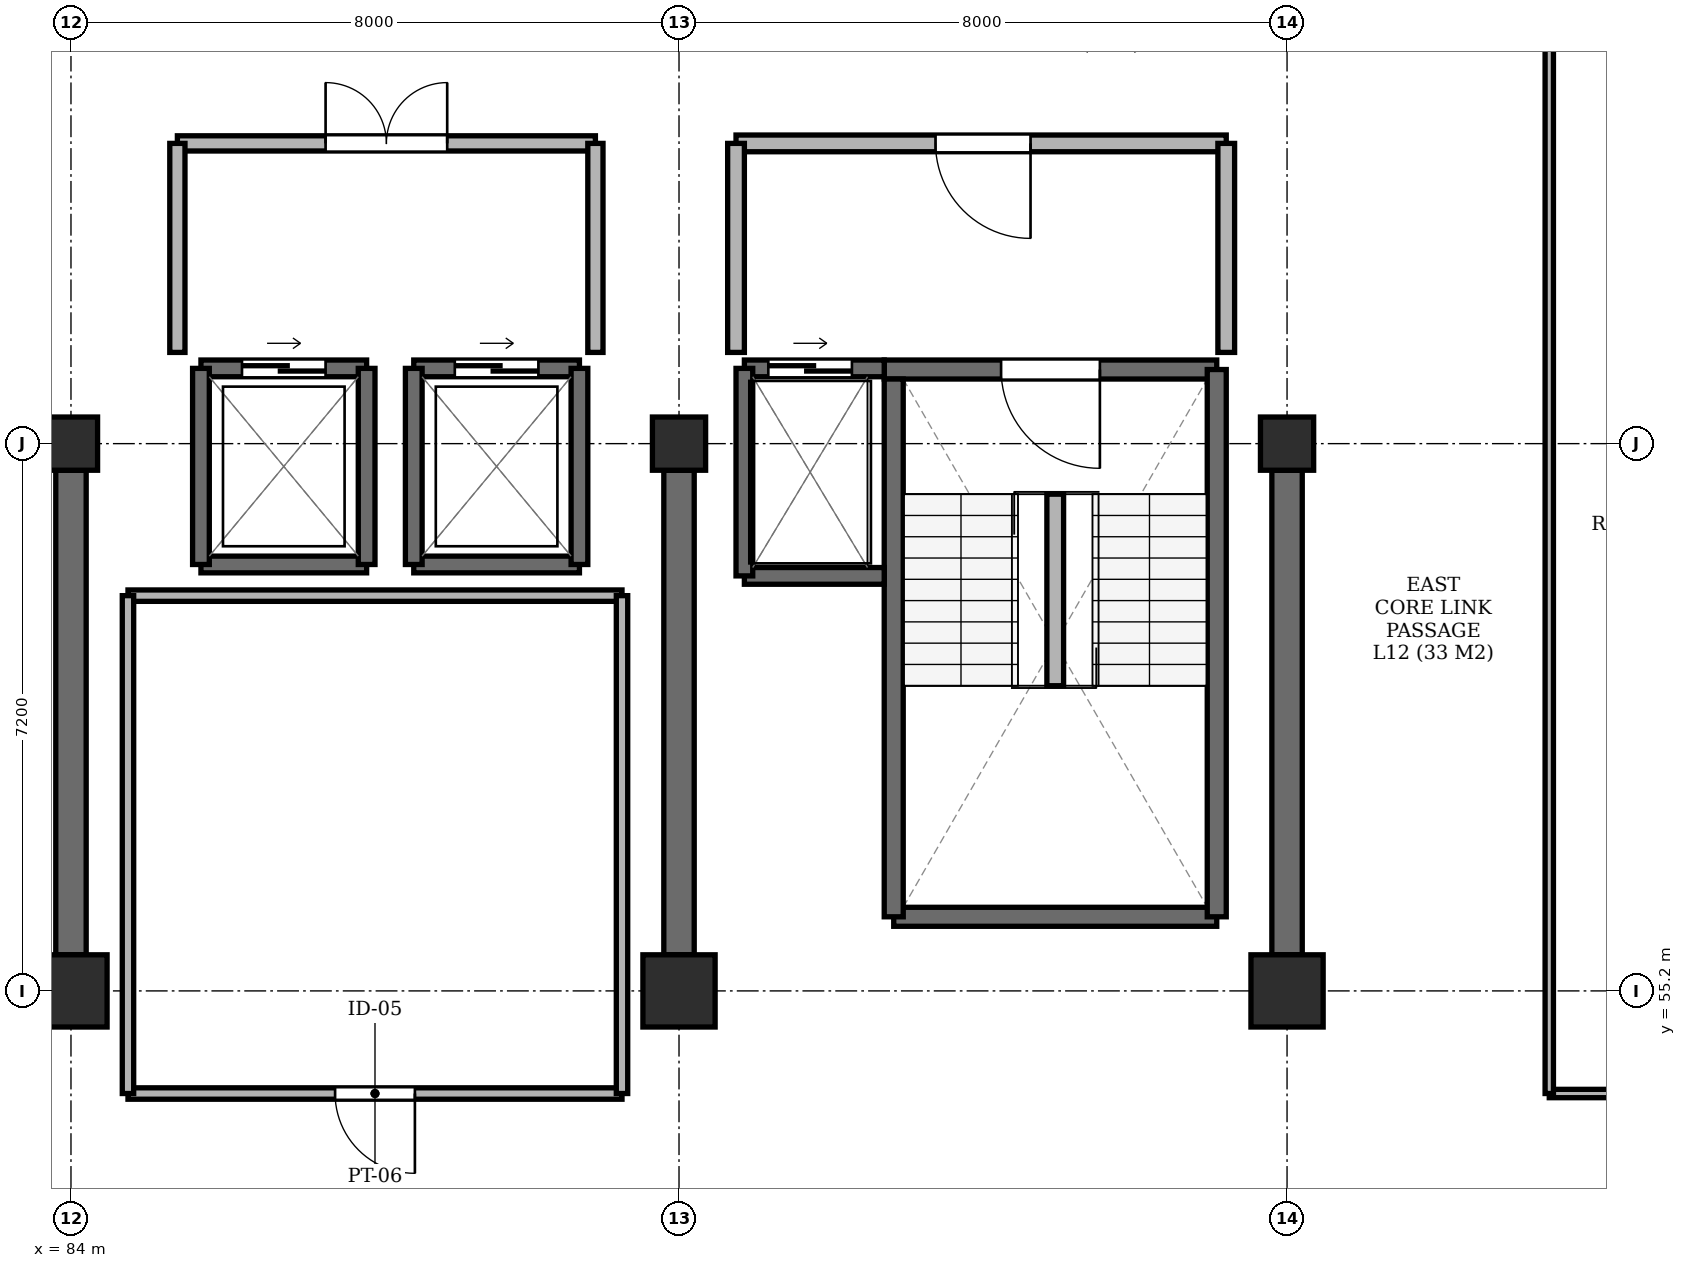
"""IFC4 building model, lengths in metres.
Left out: names, types, materials, properties, quantities, classifications, styles, units other than length and angle.
Written with IfcOpenShell. Run it as: python <this file> out.ifc"""

import sys

from ifc_helpers import new_model, si_unit, direction, frame, frame_2d, origin, origin_2d, place, context, subcontext, project, spatial, rectangle, extrude, element, fill, save


model = new_model("IFC4")
c1 = context("Model", 3, precision=1e-05, world=origin(), true_north=direction((0.0, 1.0)))
c2 = subcontext(c1, "Body", "Model", "MODEL_VIEW")
j1 = project(units=[si_unit("LENGTHUNIT", "METRE"), si_unit("PLANEANGLEUNIT", "RADIAN")], contexts=[c1])
p1 = place(None, origin())
s1 = spatial("IfcSite", under=j1, at=p1, CompositionType="ELEMENT")
p2 = place(p1, origin())
s2 = spatial("IfcBuilding", under=s1, at=p2, CompositionType="ELEMENT")
p3 = place(p2, frame((0.0, 0.0, 50.3)))
s3 = spatial("IfcBuildingStorey", under=s2, at=p3, CompositionType="ELEMENT", Elevation=50.3)
p4 = place(p3, frame((84.0, 55.2, -0.23), z_axis=(0.0, 0.0, 1.0), x_axis=(1.0, 0.0, 0.0)))
e1 = element("IfcColumn", 1, at=p4, inside=s3, PredefinedType="COLUMN", context=c2, shape_type="SweptSolid", body=[
    extrude(rectangle(XDim=0.95, YDim=0.95, at=origin_2d()), origin(), (0.0, 0.0, 1.0), 3.26),
])
p5 = place(p3, frame((84.0, 62.4, -0.23), z_axis=(0.0, 0.0, 1.0), x_axis=(1.0, 0.0, 0.0)))
e2 = element("IfcColumn", 2, at=p5, inside=s3, PredefinedType="COLUMN", context=c2, shape_type="SweptSolid", body=[
    extrude(rectangle(XDim=0.7, YDim=0.7, at=origin_2d()), origin(), (0.0, 0.0, 1.0), 3.26),
])
p6 = place(p3, frame((92.0, 55.2, -0.23), z_axis=(0.0, 0.0, 1.0), x_axis=(1.0, 0.0, 0.0)))
e3 = element("IfcColumn", 3, at=p6, inside=s3, PredefinedType="COLUMN", context=c2, shape_type="SweptSolid", body=[
    extrude(rectangle(XDim=0.95, YDim=0.95, at=origin_2d()), origin(), (0.0, 0.0, 1.0), 3.26),
])
p7 = place(p3, frame((92.0, 62.4, -0.23), z_axis=(0.0, 0.0, 1.0), x_axis=(1.0, 0.0, 0.0)))
e4 = element("IfcColumn", 4, at=p7, inside=s3, PredefinedType="COLUMN", context=c2, shape_type="SweptSolid", body=[
    extrude(rectangle(XDim=0.7, YDim=0.7, at=origin_2d()), origin(), (0.0, 0.0, 1.0), 3.26),
])
p8 = place(p3, frame((100.0, 55.2, -0.23), z_axis=(0.0, 0.0, 1.0), x_axis=(1.0, 0.0, 0.0)))
e5 = element("IfcColumn", 5, at=p8, inside=s3, PredefinedType="COLUMN", context=c2, shape_type="SweptSolid", body=[
    extrude(rectangle(XDim=0.95, YDim=0.95, at=origin_2d()), origin(), (0.0, 0.0, 1.0), 3.26),
])
p9 = place(p3, frame((100.0, 62.4, -0.23), z_axis=(0.0, 0.0, 1.0), x_axis=(1.0, 0.0, 0.0)))
e6 = element("IfcColumn", 6, at=p9, inside=s3, PredefinedType="COLUMN", context=c2, shape_type="SweptSolid", body=[
    extrude(rectangle(XDim=0.7, YDim=0.7, at=origin_2d()), origin(), (0.0, 0.0, 1.0), 3.26),
])
for number, where, z_axis, x_axis in (
    (7, (84.0, 55.675, 0.0), (0.0, 0.0, 1.0), (0.0, 1.0, 0.0)),
    (8, (92.0, 55.675, 0.0), (0.0, 0.0, 1.0), (0.0, 1.0, 0.0)),
    (9, (100.0, 55.675, 0.0), (0.0, 0.0, 1.0), (0.0, 1.0, 0.0)),
):
    element("IfcWall", number, at=place(p3, frame(where, z_axis=z_axis, x_axis=x_axis)), inside=s3, PredefinedType="SHEAR", context=c2, shape_type="SweptSolid", body=[
        extrude(rectangle(XDim=6.375, YDim=0.4, at=frame_2d((3.188, 0.0))), origin(), (0.0, 0.0, 1.0), 3.03),
    ])
p10 = place(p3, frame((94.825, 56.175, 0.0), z_axis=(0.0, 0.0, 1.0), x_axis=(1.0, 0.0, 0.0)))
e10 = element("IfcWall", 10, at=p10, inside=s3, PredefinedType="SHEAR", context=c2, shape_type="SweptSolid", body=[
    extrude(rectangle(XDim=4.25, YDim=0.25, at=frame_2d((2.125, 0.0))), origin(), (0.0, 0.0, 1.0), 3.03),
])
p11 = place(p3, frame((99.075, 63.375, 0.0), z_axis=(0.0, 0.0, 1.0), x_axis=(-1.0, 0.0, 0.0)))
e11 = element("IfcWall", 11, at=p11, inside=s3, PredefinedType="SHEAR", context=c2, shape_type="SweptSolid", body=[
    extrude(rectangle(XDim=4.375, YDim=0.25, at=frame_2d((2.188, 0.0))), origin(), (0.0, 0.0, 1.0), 3.03),
])
p12 = place(p11, frame((1.538, 0.0, 0.0)))
e12 = element("IfcOpeningElement", 12, at=p12, cuts=e11, PredefinedType="OPENING", context=c2, shape_type="SweptSolid", body=[
    extrude(rectangle(XDim=1.3, YDim=2.2, at=frame_2d((0.65, 1.1))), frame((0.0, 0.137, 0.0), z_axis=(0.0, -1.0, 0.0), x_axis=(1.0, 0.0, 0.0)), (0.0, 0.0, 1.0), 0.274),
])
p13 = place(p3, frame((94.825, 63.25, 0.0), z_axis=(0.0, 0.0, 1.0), x_axis=(0.0, -1.0, 0.0)))
e13 = element("IfcWall", 13, at=p13, inside=s3, PredefinedType="SHEAR", context=c2, shape_type="SweptSolid", body=[
    extrude(rectangle(XDim=7.075, YDim=0.25, at=frame_2d((3.538, 0.0))), origin(), (0.0, 0.0, 1.0), 3.03),
])
p14 = place(p3, frame((99.075, 56.175, 0.0), z_axis=(0.0, 0.0, 1.0), x_axis=(0.0, 1.0, 0.0)))
e14 = element("IfcWall", 14, at=p14, inside=s3, PredefinedType="SHEAR", context=c2, shape_type="SweptSolid", body=[
    extrude(rectangle(XDim=7.2, YDim=0.25, at=frame_2d((3.6, 0.0))), origin(), (0.0, 0.0, 1.0), 3.03),
])
p15 = place(p3, frame((96.95, 59.215, 0.0), z_axis=(0.0, 0.0, 1.0), x_axis=(0.0, 1.0, 0.0)))
e15 = element("IfcWall", 15, at=p15, inside=s3, PredefinedType="PARTITIONING", context=c2, shape_type="SweptSolid", body=[
    extrude(rectangle(XDim=2.52, YDim=0.22, at=frame_2d((1.26, 0.0))), origin(), (0.0, 0.0, 1.0), 3.03),
])
p16 = place(p3, frame((92.86, 60.66, 0.0), z_axis=(0.0, 0.0, 1.0), x_axis=(1.0, 0.0, 0.0)))
e16 = element("IfcWall", 16, at=p16, inside=s3, PredefinedType="SHEAR", context=c2, shape_type="SweptSolid", body=[
    extrude(rectangle(XDim=1.84, YDim=0.22, at=frame_2d((0.92, 0.0))), origin(), (0.0, 0.0, 1.0), 3.03),
])
p17 = place(p3, frame((94.7, 63.39, 0.0), z_axis=(0.0, 0.0, 1.0), x_axis=(-1.0, 0.0, 0.0)))
e17 = element("IfcWall", 17, at=p17, inside=s3, PredefinedType="SHEAR", context=c2, shape_type="SweptSolid", body=[
    extrude(rectangle(XDim=1.84, YDim=0.22, at=frame_2d((0.92, 0.0))), origin(), (0.0, 0.0, 1.0), 3.03),
])
p18 = place(p17, frame((0.425, 0.0, 0.0)))
e18 = element("IfcOpeningElement", 18, at=p18, cuts=e17, PredefinedType="OPENING", context=c2, shape_type="SweptSolid", body=[
    extrude(rectangle(XDim=1.1, YDim=2.2, at=frame_2d((0.55, 1.1))), frame((0.0, 0.122, 0.0), z_axis=(0.0, -1.0, 0.0), x_axis=(1.0, 0.0, 0.0)), (0.0, 0.0, 1.0), 0.244),
])
p19 = place(p3, frame((92.86, 63.39, 0.0), z_axis=(0.0, 0.0, 1.0), x_axis=(0.0, -1.0, 0.0)))
e19 = element("IfcWall", 19, at=p19, inside=s3, PredefinedType="SHEAR", context=c2, shape_type="SweptSolid", body=[
    extrude(rectangle(XDim=2.73, YDim=0.22, at=frame_2d((1.365, 0.0))), origin(), (0.0, 0.0, 1.0), 3.03),
])
p20 = place(p3, frame((85.71, 60.81, 0.0), z_axis=(0.0, 0.0, 1.0), x_axis=(1.0, 0.0, 0.0)))
e20 = element("IfcWall", 20, at=p20, inside=s3, PredefinedType="SHEAR", context=c2, shape_type="SweptSolid", body=[
    extrude(rectangle(XDim=2.18, YDim=0.22, at=frame_2d((1.09, 0.0))), origin(), (0.0, 0.0, 1.0), 3.03),
])
p21 = place(p3, frame((87.89, 63.39, 0.0), z_axis=(0.0, 0.0, 1.0), x_axis=(-1.0, 0.0, 0.0)))
e21 = element("IfcWall", 21, at=p21, inside=s3, PredefinedType="SHEAR", context=c2, shape_type="SweptSolid", body=[
    extrude(rectangle(XDim=2.18, YDim=0.22, at=frame_2d((1.09, 0.0))), origin(), (0.0, 0.0, 1.0), 3.03),
])
p22 = place(p21, frame((0.54, 0.0, 0.0)))
e22 = element("IfcOpeningElement", 22, at=p22, cuts=e21, PredefinedType="OPENING", context=c2, shape_type="SweptSolid", body=[
    extrude(rectangle(XDim=1.1, YDim=2.2, at=frame_2d((0.55, 1.1))), frame((0.0, 0.122, 0.0), z_axis=(0.0, -1.0, 0.0), x_axis=(1.0, 0.0, 0.0)), (0.0, 0.0, 1.0), 0.244),
])
for number, where, z_axis, x_axis in (
    (23, (85.71, 63.39, 0.0), (0.0, 0.0, 1.0), (0.0, -1.0, 0.0)),
    (24, (87.89, 60.81, 0.0), (0.0, 0.0, 1.0), (0.0, 1.0, 0.0)),
):
    element("IfcWall", number, at=place(p3, frame(where, z_axis=z_axis, x_axis=x_axis)), inside=s3, PredefinedType="SHEAR", context=c2, shape_type="SweptSolid", body=[
        extrude(rectangle(XDim=2.58, YDim=0.22, at=frame_2d((1.29, 0.0))), origin(), (0.0, 0.0, 1.0), 3.03),
    ])
p23 = place(p3, frame((88.51, 60.81, 0.0), z_axis=(0.0, 0.0, 1.0), x_axis=(1.0, 0.0, 0.0)))
e25 = element("IfcWall", 25, at=p23, inside=s3, PredefinedType="SHEAR", context=c2, shape_type="SweptSolid", body=[
    extrude(rectangle(XDim=2.18, YDim=0.22, at=frame_2d((1.09, 0.0))), origin(), (0.0, 0.0, 1.0), 3.03),
])
p24 = place(p3, frame((90.69, 63.39, 0.0), z_axis=(0.0, 0.0, 1.0), x_axis=(-1.0, 0.0, 0.0)))
e26 = element("IfcWall", 26, at=p24, inside=s3, PredefinedType="SHEAR", context=c2, shape_type="SweptSolid", body=[
    extrude(rectangle(XDim=2.18, YDim=0.22, at=frame_2d((1.09, 0.0))), origin(), (0.0, 0.0, 1.0), 3.03),
])
p25 = place(p24, frame((0.54, 0.0, 0.0)))
e27 = element("IfcOpeningElement", 27, at=p25, cuts=e26, PredefinedType="OPENING", context=c2, shape_type="SweptSolid", body=[
    extrude(rectangle(XDim=1.1, YDim=2.2, at=frame_2d((0.55, 1.1))), frame((0.0, 0.122, 0.0), z_axis=(0.0, -1.0, 0.0), x_axis=(1.0, 0.0, 0.0)), (0.0, 0.0, 1.0), 0.244),
])
for number, where, z_axis, x_axis in (
    (28, (88.51, 63.39, 0.0), (0.0, 0.0, 1.0), (0.0, -1.0, 0.0)),
    (29, (90.69, 60.81, 0.0), (0.0, 0.0, 1.0), (0.0, 1.0, 0.0)),
):
    element("IfcWall", number, at=place(p3, frame(where, z_axis=z_axis, x_axis=x_axis)), inside=s3, PredefinedType="SHEAR", context=c2, shape_type="SweptSolid", body=[
        extrude(rectangle(XDim=2.58, YDim=0.22, at=frame_2d((1.29, 0.0))), origin(), (0.0, 0.0, 1.0), 3.03),
    ])
p26 = place(p3, frame((92.75, 66.35, 0.0), z_axis=(0.0, 0.0, 1.0), x_axis=(1.0, 0.0, 0.0)))
e30 = element("IfcWall", 30, at=p26, inside=s3, PredefinedType="PARTITIONING", context=c2, shape_type="SweptSolid", body=[
    extrude(rectangle(XDim=6.45, YDim=0.22, at=frame_2d((3.225, 0.0))), origin(), (0.0, 0.0, 1.0), 2.53),
])
p27 = place(p26, frame((2.625, 0.0, 0.0)))
e31 = element("IfcOpeningElement", 31, at=p27, cuts=e30, PredefinedType="OPENING", context=c2, shape_type="SweptSolid", body=[
    extrude(rectangle(XDim=1.25, YDim=2.2, at=frame_2d((0.625, 1.1))), frame((0.0, 0.122, 0.0), z_axis=(0.0, -1.0, 0.0), x_axis=(1.0, 0.0, 0.0)), (0.0, 0.0, 1.0), 0.244),
])
for number, where, z_axis, x_axis in (
    (32, (92.75, 63.6, 0.0), (0.0, 0.0, 1.0), (0.0, 1.0, 0.0)),
    (33, (99.2, 63.6, 0.0), (0.0, 0.0, 1.0), (0.0, 1.0, 0.0)),
):
    element("IfcWall", number, at=place(p3, frame(where, z_axis=z_axis, x_axis=x_axis)), inside=s3, PredefinedType="PARTITIONING", context=c2, shape_type="SweptSolid", body=[
        extrude(rectangle(XDim=2.75, YDim=0.22, at=frame_2d((1.375, 0.0))), origin(), (0.0, 0.0, 1.0), 2.53),
    ])
p28 = place(p3, frame((85.4, 66.35, 0.0), z_axis=(0.0, 0.0, 1.0), x_axis=(1.0, 0.0, 0.0)))
e34 = element("IfcWall", 34, at=p28, inside=s3, PredefinedType="PARTITIONING", context=c2, shape_type="SweptSolid", body=[
    extrude(rectangle(XDim=5.5, YDim=0.2, at=frame_2d((2.75, 0.0))), origin(), (0.0, 0.0, 1.0), 2.53),
])
p29 = place(p28, frame((1.95, 0.0, 0.0)))
e35 = element("IfcOpeningElement", 35, at=p29, cuts=e34, PredefinedType="OPENING", context=c2, shape_type="SweptSolid", body=[
    extrude(rectangle(XDim=1.6, YDim=2.2, at=frame_2d((0.8, 1.1))), frame((0.0, 0.112, 0.0), z_axis=(0.0, -1.0, 0.0), x_axis=(1.0, 0.0, 0.0)), (0.0, 0.0, 1.0), 0.224),
])
for number, where, z_axis, x_axis in (
    (36, (85.4, 63.6, 0.0), (0.0, 0.0, 1.0), (0.0, 1.0, 0.0)),
    (37, (90.9, 63.6, 0.0), (0.0, 0.0, 1.0), (0.0, 1.0, 0.0)),
):
    element("IfcWall", number, at=place(p3, frame(where, z_axis=z_axis, x_axis=x_axis)), inside=s3, PredefinedType="PARTITIONING", context=c2, shape_type="SweptSolid", body=[
        extrude(rectangle(XDim=2.75, YDim=0.2, at=frame_2d((1.375, 0.0))), origin(), (0.0, 0.0, 1.0), 2.53),
    ])
p30 = place(p3, frame((103.45, 53.85, 0.0), z_axis=(0.0, 0.0, 1.0), x_axis=(1.0, 0.0, 0.0)))
e38 = element("IfcWall", 38, at=p30, inside=s3, PredefinedType="PARTITIONING", context=c2, shape_type="SweptSolid", body=[
    extrude(rectangle(XDim=3.75, YDim=0.11, at=frame_2d((1.875, 0.0))), origin(), (0.0, 0.0, 1.0), 2.53),
])
p31 = place(p30, frame((1.3, 0.0, 0.0)))
e39 = element("IfcOpeningElement", 39, at=p31, cuts=e38, PredefinedType="OPENING", context=c2, shape_type="SweptSolid", body=[
    extrude(rectangle(XDim=1.1, YDim=2.15, at=frame_2d((0.55, 1.075))), frame((0.0, 0.067, 0.0), z_axis=(0.0, -1.0, 0.0), x_axis=(1.0, 0.0, 0.0)), (0.0, 0.0, 1.0), 0.134),
])
p32 = place(p3, frame((103.45, 53.85, 0.0), z_axis=(0.0, 0.0, 1.0), x_axis=(0.0, 1.0, 0.0)))
e40 = element("IfcWall", 40, at=p32, inside=s3, PredefinedType="PARTITIONING", context=c2, shape_type="SweptSolid", body=[
    extrude(rectangle(XDim=14.95, YDim=0.11, at=frame_2d((7.475, 0.0))), origin(), (0.0, 0.0, 1.0), 2.53),
])
p33 = place(p3, frame((84.75, 53.85, 0.0), z_axis=(0.0, 0.0, 1.0), x_axis=(1.0, 0.0, 0.0)))
e41 = element("IfcWall", 41, at=p33, inside=s3, PredefinedType="PARTITIONING", context=c2, shape_type="SweptSolid", body=[
    extrude(rectangle(XDim=6.5, YDim=0.15, at=frame_2d((3.25, 0.0))), origin(), (0.0, 0.0, 1.0), 2.53),
])
p34 = place(p33, frame((2.725, 0.0, 0.0)))
e42 = element("IfcOpeningElement", 42, at=p34, cuts=e41, PredefinedType="OPENING", context=c2, shape_type="SweptSolid", body=[
    extrude(rectangle(XDim=1.05, YDim=2.15, at=frame_2d((0.525, 1.075))), frame((0.0, 0.087, 0.0), z_axis=(0.0, -1.0, 0.0), x_axis=(1.0, 0.0, 0.0)), (0.0, 0.0, 1.0), 0.174),
])
p35 = place(p3, frame((84.75, 60.4, 0.0), z_axis=(0.0, 0.0, 1.0), x_axis=(1.0, 0.0, 0.0)))
e43 = element("IfcWall", 43, at=p35, inside=s3, PredefinedType="PARTITIONING", context=c2, shape_type="SweptSolid", body=[
    extrude(rectangle(XDim=6.5, YDim=0.15, at=frame_2d((3.25, 0.0))), origin(), (0.0, 0.0, 1.0), 2.53),
])
for number, where, z_axis, x_axis in (
    (44, (84.75, 53.85, 0.0), (0.0, 0.0, 1.0), (0.0, 1.0, 0.0)),
    (45, (91.25, 53.85, 0.0), (0.0, 0.0, 1.0), (0.0, 1.0, 0.0)),
):
    element("IfcWall", number, at=place(p3, frame(where, z_axis=z_axis, x_axis=x_axis)), inside=s3, PredefinedType="PARTITIONING", context=c2, shape_type="SweptSolid", body=[
        extrude(rectangle(XDim=6.55, YDim=0.15, at=frame_2d((3.275, 0.0))), origin(), (0.0, 0.0, 1.0), 2.53),
    ])
p36 = place(p12, origin())
e46 = element("IfcDoor", 46, at=p36, inside=s3, OperationType="SINGLE_SWING_LEFT", PredefinedType="DOOR", context=c2, shape_type="SweptSolid", body=[
    extrude(rectangle(XDim=1.3, YDim=2.2, at=frame_2d((0.65, 1.1))), frame((0.0, 0.025, 0.0), z_axis=(0.0, -1.0, 0.0), x_axis=(1.0, 0.0, 0.0)), (0.0, 0.0, 1.0), 0.05),
])
fill(e12, e46)
p37 = place(p18, origin())
e47 = element("IfcDoor", 47, at=p37, inside=s3, OperationType="SLIDING_TO_LEFT", PredefinedType="DOOR", context=c2, shape_type="SweptSolid", body=[
    extrude(rectangle(XDim=1.1, YDim=2.2, at=frame_2d((0.55, 1.1))), frame((0.0, 0.025, 0.0), z_axis=(0.0, -1.0, 0.0), x_axis=(1.0, 0.0, 0.0)), (0.0, 0.0, 1.0), 0.05),
])
fill(e18, e47)
p38 = place(p22, origin())
e48 = element("IfcDoor", 48, at=p38, inside=s3, OperationType="SLIDING_TO_LEFT", PredefinedType="DOOR", context=c2, shape_type="SweptSolid", body=[
    extrude(rectangle(XDim=1.1, YDim=2.2, at=frame_2d((0.55, 1.1))), frame((0.0, 0.025, 0.0), z_axis=(0.0, -1.0, 0.0), x_axis=(1.0, 0.0, 0.0)), (0.0, 0.0, 1.0), 0.05),
])
fill(e22, e48)
p39 = place(p25, origin())
e49 = element("IfcDoor", 49, at=p39, inside=s3, OperationType="SLIDING_TO_LEFT", PredefinedType="DOOR", context=c2, shape_type="SweptSolid", body=[
    extrude(rectangle(XDim=1.1, YDim=2.2, at=frame_2d((0.55, 1.1))), frame((0.0, 0.025, 0.0), z_axis=(0.0, -1.0, 0.0), x_axis=(1.0, 0.0, 0.0)), (0.0, 0.0, 1.0), 0.05),
])
fill(e27, e49)
p40 = place(p27, frame((1.25, 0.0, 0.0), z_axis=(0.0, 0.0, 1.0), x_axis=(-1.0, 0.0, 0.0)))
e50 = element("IfcDoor", 50, at=p40, inside=s3, OperationType="SINGLE_SWING_RIGHT", PredefinedType="DOOR", context=c2, shape_type="SweptSolid", body=[
    extrude(rectangle(XDim=1.25, YDim=2.2, at=frame_2d((0.625, 1.1))), frame((0.0, 0.025, 0.0), z_axis=(0.0, -1.0, 0.0), x_axis=(1.0, 0.0, 0.0)), (0.0, 0.0, 1.0), 0.05),
])
fill(e31, e50)
p41 = place(p29, origin())
e51 = element("IfcDoor", 51, at=p41, inside=s3, OperationType="DOUBLE_DOOR_SINGLE_SWING", PredefinedType="DOOR", context=c2, shape_type="SweptSolid", body=[
    extrude(rectangle(XDim=1.6, YDim=2.2, at=frame_2d((0.8, 1.1))), frame((0.0, 0.025, 0.0), z_axis=(0.0, -1.0, 0.0), x_axis=(1.0, 0.0, 0.0)), (0.0, 0.0, 1.0), 0.05),
])
fill(e35, e51)
p42 = place(p34, frame((1.05, 0.0, 0.0), z_axis=(0.0, 0.0, 1.0), x_axis=(-1.0, 0.0, 0.0)))
e52 = element("IfcDoor", 52, at=p42, inside=s3, OperationType="SINGLE_SWING_RIGHT", PredefinedType="DOOR", context=c2, shape_type="SweptSolid", body=[
    extrude(rectangle(XDim=1.05, YDim=2.15, at=frame_2d((0.525, 1.075))), frame((0.0, 0.025, 0.0), z_axis=(0.0, -1.0, 0.0), x_axis=(1.0, 0.0, 0.0)), (0.0, 0.0, 1.0), 0.05),
])
fill(e42, e52)
save(model, sys.argv[1])
